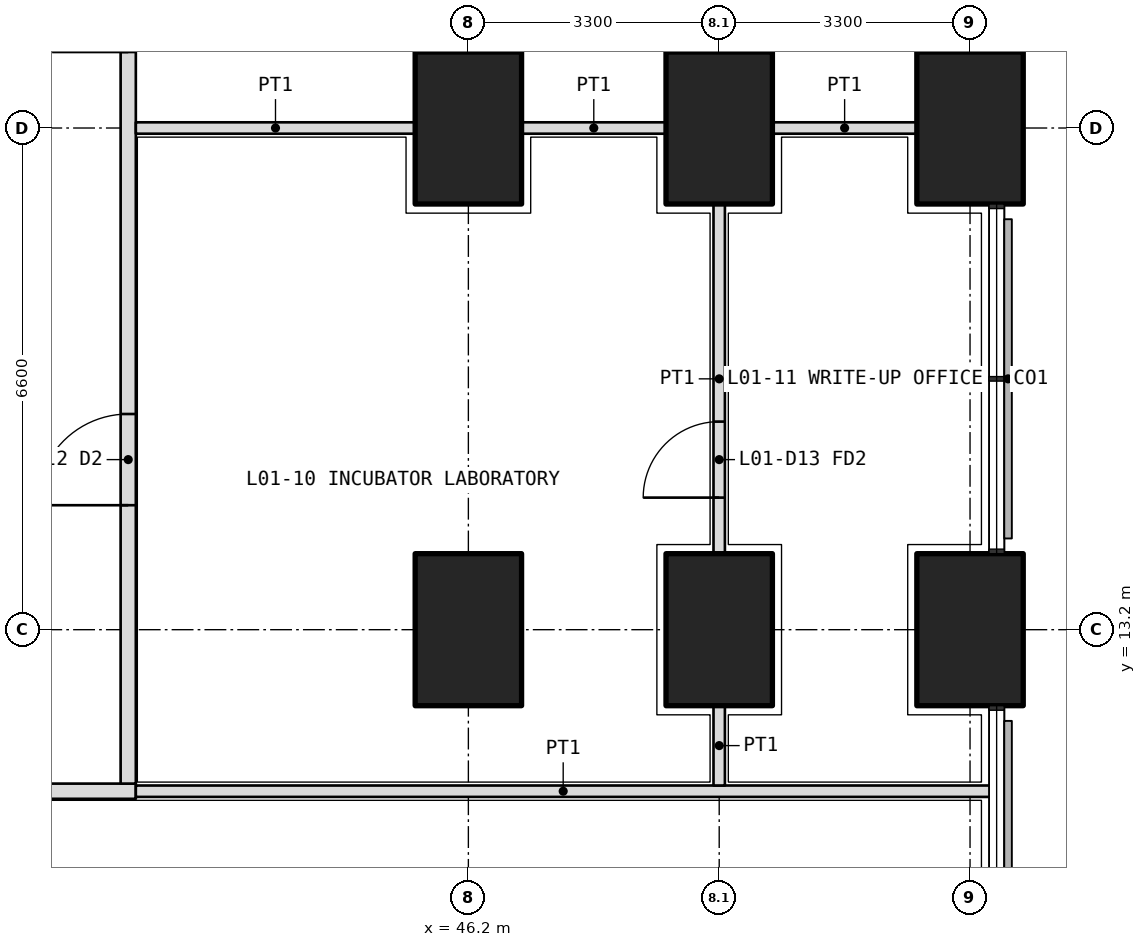
"""IFC4 building model, lengths in metres.
Left out: names, types, materials, properties, quantities, classifications, styles, units other than length and angle.
Written with IfcOpenShell. Run it as: python <this file> out.ifc"""

import sys

from ifc_helpers import new_model, si_unit, direction, frame, frame_2d, origin, origin_2d, place, context, subcontext, project, spatial, rectangle, extrude, element, fill, save


model = new_model("IFC4")
c1 = context("Model", 3, precision=1e-05, world=origin(), true_north=direction((0.0, 1.0)))
c2 = subcontext(c1, "Body", "Model", "MODEL_VIEW")
j1 = project(units=[si_unit("LENGTHUNIT", "METRE"), si_unit("PLANEANGLEUNIT", "RADIAN")], contexts=[c1])
p1 = place(None, origin())
s1 = spatial("IfcSite", under=j1, at=p1, CompositionType="ELEMENT")
p2 = place(p1, origin())
s2 = spatial("IfcBuilding", under=s1, at=p2, CompositionType="ELEMENT")
p3 = place(p2, frame((0.0, 0.0, 7.2)))
s3 = spatial("IfcBuildingStorey", under=s2, at=p3, CompositionType="ELEMENT", Elevation=7.2)
for number, where, z_axis, x_axis in (
    (1, (52.8, 13.2, 0.0), (0.0, 0.0, 1.0), (0.0, 1.0, 0.0)),
    (2, (52.8, 19.8, 0.0), (0.0, 0.0, 1.0), (0.0, 1.0, 0.0)),
    (3, (49.5, 13.2, 0.0), (0.0, 0.0, 1.0), (0.0, 1.0, 0.0)),
    (4, (49.5, 19.8, 0.0), (0.0, 0.0, 1.0), (0.0, 1.0, 0.0)),
    (5, (46.2, 13.2, 0.0), (0.0, 0.0, 1.0), (0.0, 1.0, 0.0)),
    (6, (46.2, 19.8, 0.0), (0.0, 0.0, 1.0), (0.0, 1.0, 0.0)),
):
    element("IfcColumn", number, at=place(p3, frame(where, z_axis=z_axis, x_axis=x_axis)), inside=s3, PredefinedType="COLUMN", context=c2, shape_type="SweptSolid", body=[
        extrude(rectangle(XDim=2.0, YDim=1.4, at=origin_2d()), origin(), (0.0, 0.0, 1.0), 5.4),
    ])
p4 = place(p3, frame((10.975, 11.075, 0.0), z_axis=(0.0, 0.0, 1.0), x_axis=(1.0, 0.0, 0.0)))
e7 = element("IfcWall", 7, at=p4, inside=s3, PredefinedType="PARTITIONING", context=c2, shape_type="SweptSolid", body=[
    extrude(rectangle(XDim=30.85, YDim=0.2, at=frame_2d((15.425, 0.0))), origin(), (0.0, 0.0, 1.0), 4.05),
])
p5 = place(p4, frame((3.863, 0.0, 0.0)))
e8 = element("IfcOpeningElement", 8, at=p5, cuts=e7, PredefinedType="OPENING", context=c2, shape_type="SweptSolid", body=[
    extrude(rectangle(XDim=1.2, YDim=2.1, at=frame_2d((0.6, 1.05))), frame((0.0, 0.11, 0.0), z_axis=(0.0, -1.0, 0.0), x_axis=(1.0, 0.0, 0.0)), (0.0, 0.0, 1.0), 0.22),
])
p6 = place(p4, frame((9.375, 0.0, 0.0)))
e9 = element("IfcOpeningElement", 9, at=p6, cuts=e7, PredefinedType="OPENING", context=c2, shape_type="SweptSolid", body=[
    extrude(rectangle(XDim=1.0, YDim=2.1, at=frame_2d((0.5, 1.05))), frame((0.0, 0.11, 0.0), z_axis=(0.0, -1.0, 0.0), x_axis=(1.0, 0.0, 0.0)), (0.0, 0.0, 1.0), 0.22),
])
p7 = place(p4, frame((12.475, 0.0, 0.0)))
e10 = element("IfcOpeningElement", 10, at=p7, cuts=e7, PredefinedType="OPENING", context=c2, shape_type="SweptSolid", body=[
    extrude(rectangle(XDim=0.9, YDim=2.1, at=frame_2d((0.45, 1.05))), frame((0.0, 0.11, 0.0), z_axis=(0.0, -1.0, 0.0), x_axis=(1.0, 0.0, 0.0)), (0.0, 0.0, 1.0), 0.22),
])
p8 = place(p4, frame((16.375, 0.0, 0.0)))
e11 = element("IfcOpeningElement", 11, at=p8, cuts=e7, PredefinedType="OPENING", context=c2, shape_type="SweptSolid", body=[
    extrude(rectangle(XDim=0.9, YDim=2.1, at=frame_2d((0.45, 1.05))), frame((0.0, 0.11, 0.0), z_axis=(0.0, -1.0, 0.0), x_axis=(1.0, 0.0, 0.0)), (0.0, 0.0, 1.0), 0.22),
])
p9 = place(p4, frame((19.775, 0.0, 0.0)))
e12 = element("IfcOpeningElement", 12, at=p9, cuts=e7, PredefinedType="OPENING", context=c2, shape_type="SweptSolid", body=[
    extrude(rectangle(XDim=1.2, YDim=2.1, at=frame_2d((0.6, 1.05))), frame((0.0, 0.11, 0.0), z_axis=(0.0, -1.0, 0.0), x_axis=(1.0, 0.0, 0.0)), (0.0, 0.0, 1.0), 0.22),
])
p10 = place(p4, frame((25.887, 0.0, 0.0)))
e13 = element("IfcOpeningElement", 13, at=p10, cuts=e7, PredefinedType="OPENING", context=c2, shape_type="SweptSolid", body=[
    extrude(rectangle(XDim=1.0, YDim=2.1, at=frame_2d((0.5, 1.05))), frame((0.0, 0.11, 0.0), z_axis=(0.0, -1.0, 0.0), x_axis=(1.0, 0.0, 0.0)), (0.0, 0.0, 1.0), 0.22),
])
p11 = place(p3, frame((41.725, 11.175, 0.0), z_axis=(0.0, 0.0, 1.0), x_axis=(0.0, 1.0, 0.0)))
e14 = element("IfcWall", 14, at=p11, inside=s3, PredefinedType="PARTITIONING", context=c2, shape_type="SweptSolid", body=[
    extrude(rectangle(XDim=23.85, YDim=0.2, at=frame_2d((11.925, 0.0))), origin(), (0.0, 0.0, 1.0), 4.05),
])
p12 = place(p11, frame((3.663, 0.0, 0.0)))
e15 = element("IfcOpeningElement", 15, at=p12, cuts=e14, PredefinedType="OPENING", context=c2, shape_type="SweptSolid", body=[
    extrude(rectangle(XDim=1.2, YDim=2.1, at=frame_2d((0.6, 1.05))), frame((0.0, 0.11, 0.0), z_axis=(0.0, -1.0, 0.0), x_axis=(1.0, 0.0, 0.0)), (0.0, 0.0, 1.0), 0.22),
])
p13 = place(p11, frame((9.625, 0.0, 0.0)))
e16 = element("IfcOpeningElement", 16, at=p13, cuts=e14, PredefinedType="OPENING", context=c2, shape_type="SweptSolid", body=[
    extrude(rectangle(XDim=1.0, YDim=2.1, at=frame_2d((0.5, 1.05))), frame((0.0, 0.11, 0.0), z_axis=(0.0, -1.0, 0.0), x_axis=(1.0, 0.0, 0.0)), (0.0, 0.0, 1.0), 0.22),
])
p14 = place(p11, frame((12.975, 0.0, 0.0)))
e17 = element("IfcOpeningElement", 17, at=p14, cuts=e14, PredefinedType="OPENING", context=c2, shape_type="SweptSolid", body=[
    extrude(rectangle(XDim=0.9, YDim=2.1, at=frame_2d((0.45, 1.05))), frame((0.0, 0.11, 0.0), z_axis=(0.0, -1.0, 0.0), x_axis=(1.0, 0.0, 0.0)), (0.0, 0.0, 1.0), 0.22),
])
p15 = place(p11, frame((18.025, 0.0, 0.0)))
e18 = element("IfcOpeningElement", 18, at=p15, cuts=e14, PredefinedType="OPENING", context=c2, shape_type="SweptSolid", body=[
    extrude(rectangle(XDim=1.0, YDim=2.1, at=frame_2d((0.5, 1.05))), frame((0.0, 0.11, 0.0), z_axis=(0.0, -1.0, 0.0), x_axis=(1.0, 0.0, 0.0)), (0.0, 0.0, 1.0), 0.22),
])
p16 = place(p11, frame((22.387, 0.0, 0.0)))
e19 = element("IfcOpeningElement", 19, at=p16, cuts=e14, PredefinedType="OPENING", context=c2, shape_type="SweptSolid", body=[
    extrude(rectangle(XDim=1.0, YDim=2.1, at=frame_2d((0.5, 1.05))), frame((0.0, 0.11, 0.0), z_axis=(0.0, -1.0, 0.0), x_axis=(1.0, 0.0, 0.0)), (0.0, 0.0, 1.0), 0.22),
])
p17 = place(p3, frame((53.07, 11.075, 0.0), z_axis=(0.0, 0.0, 1.0), x_axis=(-1.0, 0.0, 0.0)))
e20 = element("IfcWall", 20, at=p17, inside=s3, PredefinedType="PARTITIONING", context=c2, shape_type="SweptSolid", body=[
    extrude(rectangle(XDim=11.245, YDim=0.15, at=frame_2d((5.623, 0.0))), origin(), (0.0, 0.0, 1.0), 3.9),
])
p18 = place(p3, frame((49.5, 11.15, 0.0), z_axis=(0.0, 0.0, 1.0), x_axis=(0.0, 1.0, 0.0)))
e21 = element("IfcWall", 21, at=p18, inside=s3, PredefinedType="PARTITIONING", context=c2, shape_type="SweptSolid", body=[
    extrude(rectangle(XDim=1.05, YDim=0.15, at=frame_2d((0.525, 0.0))), origin(), (0.0, 0.0, 1.0), 5.1),
])
p19 = place(p3, frame((49.5, 14.2, 0.0), z_axis=(0.0, 0.0, 1.0), x_axis=(0.0, 1.0, 0.0)))
e22 = element("IfcWall", 22, at=p19, inside=s3, PredefinedType="PARTITIONING", context=c2, shape_type="SweptSolid", body=[
    extrude(rectangle(XDim=4.6, YDim=0.15, at=frame_2d((2.3, 0.0))), origin(), (0.0, 0.0, 1.0), 5.1),
])
p20 = place(p19, frame((0.738, 0.0, 0.0)))
e23 = element("IfcOpeningElement", 23, at=p20, cuts=e22, PredefinedType="OPENING", context=c2, shape_type="SweptSolid", body=[
    extrude(rectangle(XDim=1.0, YDim=2.1, at=frame_2d((0.5, 1.05))), frame((0.0, 0.085, 0.0), z_axis=(0.0, -1.0, 0.0), x_axis=(1.0, 0.0, 0.0)), (0.0, 0.0, 1.0), 0.17),
])
for number, where, z_axis, x_axis in (
    (24, (52.1, 19.8, 0.0), (0.0, 0.0, 1.0), (-1.0, 0.0, 0.0)),
    (25, (48.8, 19.8, 0.0), (0.0, 0.0, 1.0), (-1.0, 0.0, 0.0)),
):
    element("IfcWall", number, at=place(p3, frame(where, z_axis=z_axis, x_axis=x_axis)), inside=s3, PredefinedType="PARTITIONING", context=c2, shape_type="SweptSolid", body=[
        extrude(rectangle(XDim=1.9, YDim=0.15, at=frame_2d((0.95, 0.0))), origin(), (0.0, 0.0, 1.0), 4.05),
    ])
p21 = place(p3, frame((45.5, 19.8, 0.0), z_axis=(0.0, 0.0, 1.0), x_axis=(-1.0, 0.0, 0.0)))
e26 = element("IfcWall", 26, at=p21, inside=s3, PredefinedType="PARTITIONING", context=c2, shape_type="SweptSolid", body=[
    extrude(rectangle(XDim=3.675, YDim=0.15, at=frame_2d((1.837, 0.0))), origin(), (0.0, 0.0, 1.0), 4.05),
])
p22 = place(p12, origin())
e27 = element("IfcDoor", 27, at=p22, inside=s3, OperationType="DOUBLE_DOOR_SINGLE_SWING", PredefinedType="DOOR", context=c2, shape_type="SweptSolid", body=[
    extrude(rectangle(XDim=1.2, YDim=2.1, at=frame_2d((0.6, 1.05))), frame((0.0, 0.025, 0.0), z_axis=(0.0, -1.0, 0.0), x_axis=(1.0, 0.0, 0.0)), (0.0, 0.0, 1.0), 0.05),
])
fill(e15, e27)
p23 = place(p20, origin())
e28 = element("IfcDoor", 28, at=p23, inside=s3, OperationType="SINGLE_SWING_LEFT", PredefinedType="DOOR", context=c2, shape_type="SweptSolid", body=[
    extrude(rectangle(XDim=1.0, YDim=2.1, at=frame_2d((0.5, 1.05))), frame((0.0, 0.025, 0.0), z_axis=(0.0, -1.0, 0.0), x_axis=(1.0, 0.0, 0.0)), (0.0, 0.0, 1.0), 0.05),
])
fill(e23, e28)
save(model, sys.argv[1])
